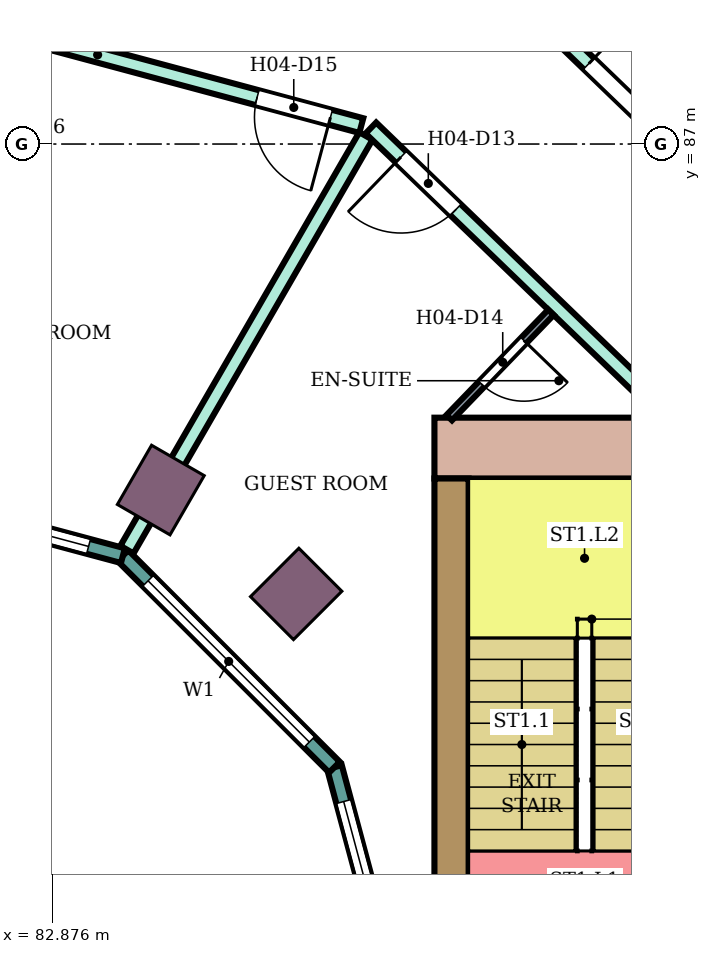
"""IFC4 building model, lengths in metres.
Left out: names, types, materials, properties, quantities, classifications, styles, units other than length and angle.
Written with IfcOpenShell. Run it as: python <this file> out.ifc"""

import sys

from ifc_helpers import new_model, si_unit, direction, frame, frame_2d, origin, origin_2d, place, context, subcontext, project, spatial, rectangle, extrude, element, fill, save


model = new_model("IFC4")
c1 = context("Model", 3, precision=1e-05, world=origin(), true_north=direction((0.0, 1.0)))
c2 = subcontext(c1, "Body", "Model", "MODEL_VIEW")
j1 = project(units=[si_unit("LENGTHUNIT", "METRE"), si_unit("PLANEANGLEUNIT", "RADIAN")], contexts=[c1])
p1 = place(None, origin())
s1 = spatial("IfcSite", under=j1, at=p1, CompositionType="ELEMENT")
p2 = place(p1, origin())
s2 = spatial("IfcBuilding", under=s1, at=p2, CompositionType="ELEMENT")
p3 = place(p2, frame((0.0, 0.0, 70.6)))
s3 = spatial("IfcBuildingStorey", under=s2, at=p3, CompositionType="ELEMENT", Elevation=70.6)
for number, where, z_axis, x_axis in (
    (1, (86.081, 81.081, 0.0), (0.0, 0.0, 1.0), (0.707, 0.707, 0.0)),
    (2, (84.3, 82.448, 0.0), (0.0, 0.0, 1.0), (0.5, 0.866, 0.0)),
):
    element("IfcColumn", number, at=place(p3, frame(where, z_axis=z_axis, x_axis=x_axis)), inside=s3, PredefinedType="COLUMN", context=c2, shape_type="SweptSolid", body=[
        extrude(rectangle(XDim=0.9, YDim=0.8, at=origin_2d()), origin(), (0.0, 0.0, 1.0), 3.8),
    ])
p4 = place(p3, frame((87.9, 83.0, 0.0), z_axis=(0.0, 0.0, 1.0), x_axis=(1.0, 0.0, 0.0)))
e3 = element("IfcWall", 3, at=p4, inside=s3, PredefinedType="SHEAR", context=c2, shape_type="SweptSolid", body=[
    extrude(rectangle(XDim=14.7, YDim=0.8, at=frame_2d((7.35, 0.0))), origin(), (0.0, 0.0, 1.0), 3.4),
])
p5 = place(p4, frame((4.2, 0.0, 0.0)))
e4 = element("IfcOpeningElement", 4, at=p5, cuts=e3, PredefinedType="OPENING", context=c2, shape_type="SweptSolid", body=[
    extrude(rectangle(XDim=2.4, YDim=2.4, at=frame_2d((1.2, 1.2))), frame((0.0, 0.41, 0.0), z_axis=(0.0, -1.0, 0.0), x_axis=(1.0, 0.0, 0.0)), (0.0, 0.0, 1.0), 0.82),
])
p6 = place(p3, frame((88.125, 75.0, 0.0), z_axis=(0.0, 0.0, 1.0), x_axis=(0.0, 1.0, 0.0)))
e5 = element("IfcWall", 5, at=p6, inside=s3, PredefinedType="SHEAR", context=c2, shape_type="SweptSolid", body=[
    extrude(rectangle(XDim=7.6, YDim=0.45, at=frame_2d((3.8, 0.0))), origin(), (0.0, 0.0, 1.0), 3.4),
])
p7 = place(p3, frame((87.604, 75.0, 0.0), z_axis=(0.0, 0.0, 1.0), x_axis=(-0.258789828301, 0.965933654434, 0.0)))
e6 = element("IfcWall", 6, at=p7, inside=s3, PredefinedType="NOTDEFINED", context=c2, shape_type="SweptSolid", body=[
    extrude(rectangle(XDim=3.936, YDim=0.2, at=frame_2d((1.968, 0.0))), origin(), (0.0, 0.0, 1.0), 3.8),
])
p8 = place(p7, frame((0.468, 0.0, 0.9)))
e7 = element("IfcOpeningElement", 7, at=p8, cuts=e6, PredefinedType="OPENING", context=c2, shape_type="SweptSolid", body=[
    extrude(rectangle(XDim=3.0, YDim=2.3, at=frame_2d((1.5, 1.15))), frame((0.0, 0.11, 0.0), z_axis=(0.0, -1.0, 0.0), x_axis=(1.0, 0.0, 0.0)), (0.0, 0.0, 1.0), 0.22),
])
p9 = place(p3, frame((86.585, 78.802, 0.0), z_axis=(0.0, 0.0, 1.0), x_axis=(-0.707106781187, 0.707106781187, 0.0)))
e8 = element("IfcWall", 8, at=p9, inside=s3, PredefinedType="NOTDEFINED", context=c2, shape_type="SweptSolid", body=[
    extrude(rectangle(XDim=3.936, YDim=0.2, at=frame_2d((1.968, 0.0))), origin(), (0.0, 0.0, 1.0), 3.8),
])
p10 = place(p9, frame((0.468, 0.0, 0.9)))
e9 = element("IfcOpeningElement", 9, at=p10, cuts=e8, PredefinedType="OPENING", context=c2, shape_type="SweptSolid", body=[
    extrude(rectangle(XDim=3.0, YDim=2.3, at=frame_2d((1.5, 1.15))), frame((0.0, 0.11, 0.0), z_axis=(0.0, -1.0, 0.0), x_axis=(1.0, 0.0, 0.0)), (0.0, 0.0, 1.0), 0.22),
])
p11 = place(p3, frame((83.802, 81.585, 0.0), z_axis=(0.0, 0.0, 1.0), x_axis=(-0.965933654434, 0.258789828301, 0.0)))
e10 = element("IfcWall", 10, at=p11, inside=s3, PredefinedType="NOTDEFINED", context=c2, shape_type="SweptSolid", body=[
    extrude(rectangle(XDim=3.936, YDim=0.2, at=frame_2d((1.968, 0.0))), origin(), (0.0, 0.0, 1.0), 3.8),
])
p12 = place(p11, frame((0.468, 0.0, 0.9)))
e11 = element("IfcOpeningElement", 11, at=p12, cuts=e10, PredefinedType="OPENING", context=c2, shape_type="SweptSolid", body=[
    extrude(rectangle(XDim=3.0, YDim=2.3, at=frame_2d((1.5, 1.15))), frame((0.0, 0.11, 0.0), z_axis=(0.0, -1.0, 0.0), x_axis=(1.0, 0.0, 0.0)), (0.0, 0.0, 1.0), 0.22),
])
p13 = place(p3, frame((80.0, 89.104, 0.0), z_axis=(0.0, 0.0, 1.0), x_axis=(0.965854247166, -0.25908603442, 0.0)))
e12 = element("IfcWall", 12, at=p13, inside=s3, PredefinedType="PARTITIONING", context=c2, shape_type="SweptSolid", body=[
    extrude(rectangle(XDim=7.183, YDim=0.2, at=frame_2d((3.592, 0.0))), origin(), (0.0, 0.0, 1.0), 3.35),
])
p14 = place(p13, frame((5.763, 0.0, 0.0)))
e13 = element("IfcOpeningElement", 13, at=p14, cuts=e12, PredefinedType="OPENING", context=c2, shape_type="SweptSolid", body=[
    extrude(rectangle(XDim=1.0, YDim=2.1, at=frame_2d((0.5, 1.05))), frame((0.0, 0.11, 0.0), z_axis=(0.0, -1.0, 0.0), x_axis=(1.0, 0.0, 0.0)), (0.0, 0.0, 1.0), 0.22),
])
p15 = place(p3, frame((83.854, 81.664, 0.0), z_axis=(0.0, 0.0, 1.0), x_axis=(0.500224530691, 0.865895732115, 0.0)))
e14 = element("IfcWall", 14, at=p15, inside=s3, PredefinedType="PARTITIONING", context=c2, shape_type="SweptSolid", body=[
    extrude(rectangle(XDim=6.285, YDim=0.2, at=frame_2d((3.143, 0.0))), origin(), (0.0, 0.0, 1.0), 3.35),
])
p16 = place(p3, frame((87.064, 87.211, 0.0), z_axis=(0.0, 0.0, 1.0), x_axis=(0.719540958932, -0.694450004262, 0.0)))
e15 = element("IfcWall", 15, at=p16, inside=s3, PredefinedType="PARTITIONING", context=c2, shape_type="SweptSolid", body=[
    extrude(rectangle(XDim=5.488, YDim=0.2, at=frame_2d((2.744, 0.0))), origin(), (0.0, 0.0, 1.0), 3.35),
])
p17 = place(p16, frame((0.55, 0.0, 0.0)))
e16 = element("IfcOpeningElement", 16, at=p17, cuts=e15, PredefinedType="OPENING", context=c2, shape_type="SweptSolid", body=[
    extrude(rectangle(XDim=1.0, YDim=2.1, at=frame_2d((0.5, 1.05))), frame((0.0, 0.11, 0.0), z_axis=(0.0, -1.0, 0.0), x_axis=(1.0, 0.0, 0.0)), (0.0, 0.0, 1.0), 0.22),
])
p18 = place(p3, frame((88.386, 89.549, 0.0), z_axis=(0.0, 0.0, 1.0), x_axis=(0.719560576741, -0.694429677073, 0.0)))
e17 = element("IfcWall", 17, at=p18, inside=s3, PredefinedType="PARTITIONING", context=c2, shape_type="SweptSolid", body=[
    extrude(rectangle(XDim=6.635, YDim=0.2, at=frame_2d((3.318, 0.0))), origin(), (0.0, 0.0, 1.0), 3.35),
])
p19 = place(p18, frame((2.147, 0.0, 0.0)))
e18 = element("IfcOpeningElement", 18, at=p19, cuts=e17, PredefinedType="OPENING", context=c2, shape_type="SweptSolid", body=[
    extrude(rectangle(XDim=1.8, YDim=2.1, at=frame_2d((0.9, 1.05))), frame((0.0, 0.11, 0.0), z_axis=(0.0, -1.0, 0.0), x_axis=(1.0, 0.0, 0.0)), (0.0, 0.0, 1.0), 0.22),
])
p20 = place(p3, frame((88.095, 83.4, 0.0), z_axis=(0.0, 0.0, 1.0), x_axis=(0.694447472534, 0.719543402368, 0.0)))
e19 = element("IfcWall", 19, at=p20, inside=s3, PredefinedType="PARTITIONING", context=c2, shape_type="SweptSolid", body=[
    extrude(rectangle(XDim=1.926, YDim=0.1, at=frame_2d((0.963, 0.0))), origin(), (0.0, 0.0, 1.0), 3.35),
])
p21 = place(p20, frame((0.613, 0.0, 0.0)))
e20 = element("IfcOpeningElement", 20, at=p21, cuts=e19, PredefinedType="OPENING", context=c2, shape_type="SweptSolid", body=[
    extrude(rectangle(XDim=0.8, YDim=2.1, at=frame_2d((0.4, 1.05))), frame((0.0, 0.06, 0.0), z_axis=(0.0, -1.0, 0.0), x_axis=(1.0, 0.0, 0.0)), (0.0, 0.0, 1.0), 0.12),
])
p22 = place(p8, origin())
e21 = element("IfcWindow", 21, at=p22, inside=s3, PartitioningType="SINGLE_PANEL", PredefinedType="WINDOW", context=c2, shape_type="SweptSolid", body=[
    extrude(rectangle(XDim=3.0, YDim=2.3, at=frame_2d((1.5, 1.15))), frame((0.0, 0.03, 0.0), z_axis=(0.0, -1.0, 0.0), x_axis=(1.0, 0.0, 0.0)), (0.0, 0.0, 1.0), 0.06),
])
fill(e7, e21)
p23 = place(p10, origin())
e22 = element("IfcWindow", 22, at=p23, inside=s3, PartitioningType="SINGLE_PANEL", PredefinedType="WINDOW", context=c2, shape_type="SweptSolid", body=[
    extrude(rectangle(XDim=3.0, YDim=2.3, at=frame_2d((1.5, 1.15))), frame((0.0, 0.03, 0.0), z_axis=(0.0, -1.0, 0.0), x_axis=(1.0, 0.0, 0.0)), (0.0, 0.0, 1.0), 0.06),
])
fill(e9, e22)
p24 = place(p12, origin())
e23 = element("IfcWindow", 23, at=p24, inside=s3, PartitioningType="SINGLE_PANEL", PredefinedType="WINDOW", context=c2, shape_type="SweptSolid", body=[
    extrude(rectangle(XDim=3.0, YDim=2.3, at=frame_2d((1.5, 1.15))), frame((0.0, 0.03, 0.0), z_axis=(0.0, -1.0, 0.0), x_axis=(1.0, 0.0, 0.0)), (0.0, 0.0, 1.0), 0.06),
])
fill(e11, e23)
p25 = place(p19, origin())
e24 = element("IfcDoor", 24, at=p25, inside=s3, OperationType="DOUBLE_DOOR_SINGLE_SWING", PredefinedType="DOOR", context=c2, shape_type="SweptSolid", body=[
    extrude(rectangle(XDim=1.8, YDim=2.1, at=frame_2d((0.9, 1.05))), frame((0.0, 0.025, 0.0), z_axis=(0.0, -1.0, 0.0), x_axis=(1.0, 0.0, 0.0)), (0.0, 0.0, 1.0), 0.05),
])
fill(e18, e24)
p26 = place(p17, frame((1.0, 0.0, 0.0), z_axis=(0.0, 0.0, 1.0), x_axis=(-1.0, 0.0, 0.0)))
e25 = element("IfcDoor", 25, at=p26, inside=s3, OperationType="SINGLE_SWING_RIGHT", PredefinedType="DOOR", context=c2, shape_type="SweptSolid", body=[
    extrude(rectangle(XDim=1.0, YDim=2.1, at=frame_2d((0.5, 1.05))), frame((0.0, 0.025, 0.0), z_axis=(0.0, -1.0, 0.0), x_axis=(1.0, 0.0, 0.0)), (0.0, 0.0, 1.0), 0.05),
])
fill(e16, e25)
p27 = place(p21, frame((0.8, 0.0, 0.0), z_axis=(0.0, 0.0, 1.0), x_axis=(-1.0, 0.0, 0.0)))
e26 = element("IfcDoor", 26, at=p27, inside=s3, OperationType="SINGLE_SWING_LEFT", PredefinedType="DOOR", context=c2, shape_type="SweptSolid", body=[
    extrude(rectangle(XDim=0.8, YDim=2.1, at=frame_2d((0.4, 1.05))), frame((0.0, 0.025, 0.0), z_axis=(0.0, -1.0, 0.0), x_axis=(1.0, 0.0, 0.0)), (0.0, 0.0, 1.0), 0.05),
])
fill(e20, e26)
p28 = place(p14, frame((1.0, 0.0, 0.0), z_axis=(0.0, 0.0, 1.0), x_axis=(-1.0, 0.0, 0.0)))
e27 = element("IfcDoor", 27, at=p28, inside=s3, OperationType="SINGLE_SWING_LEFT", PredefinedType="DOOR", context=c2, shape_type="SweptSolid", body=[
    extrude(rectangle(XDim=1.0, YDim=2.1, at=frame_2d((0.5, 1.05))), frame((0.0, 0.025, 0.0), z_axis=(0.0, -1.0, 0.0), x_axis=(1.0, 0.0, 0.0)), (0.0, 0.0, 1.0), 0.05),
])
fill(e13, e27)
save(model, sys.argv[1])
